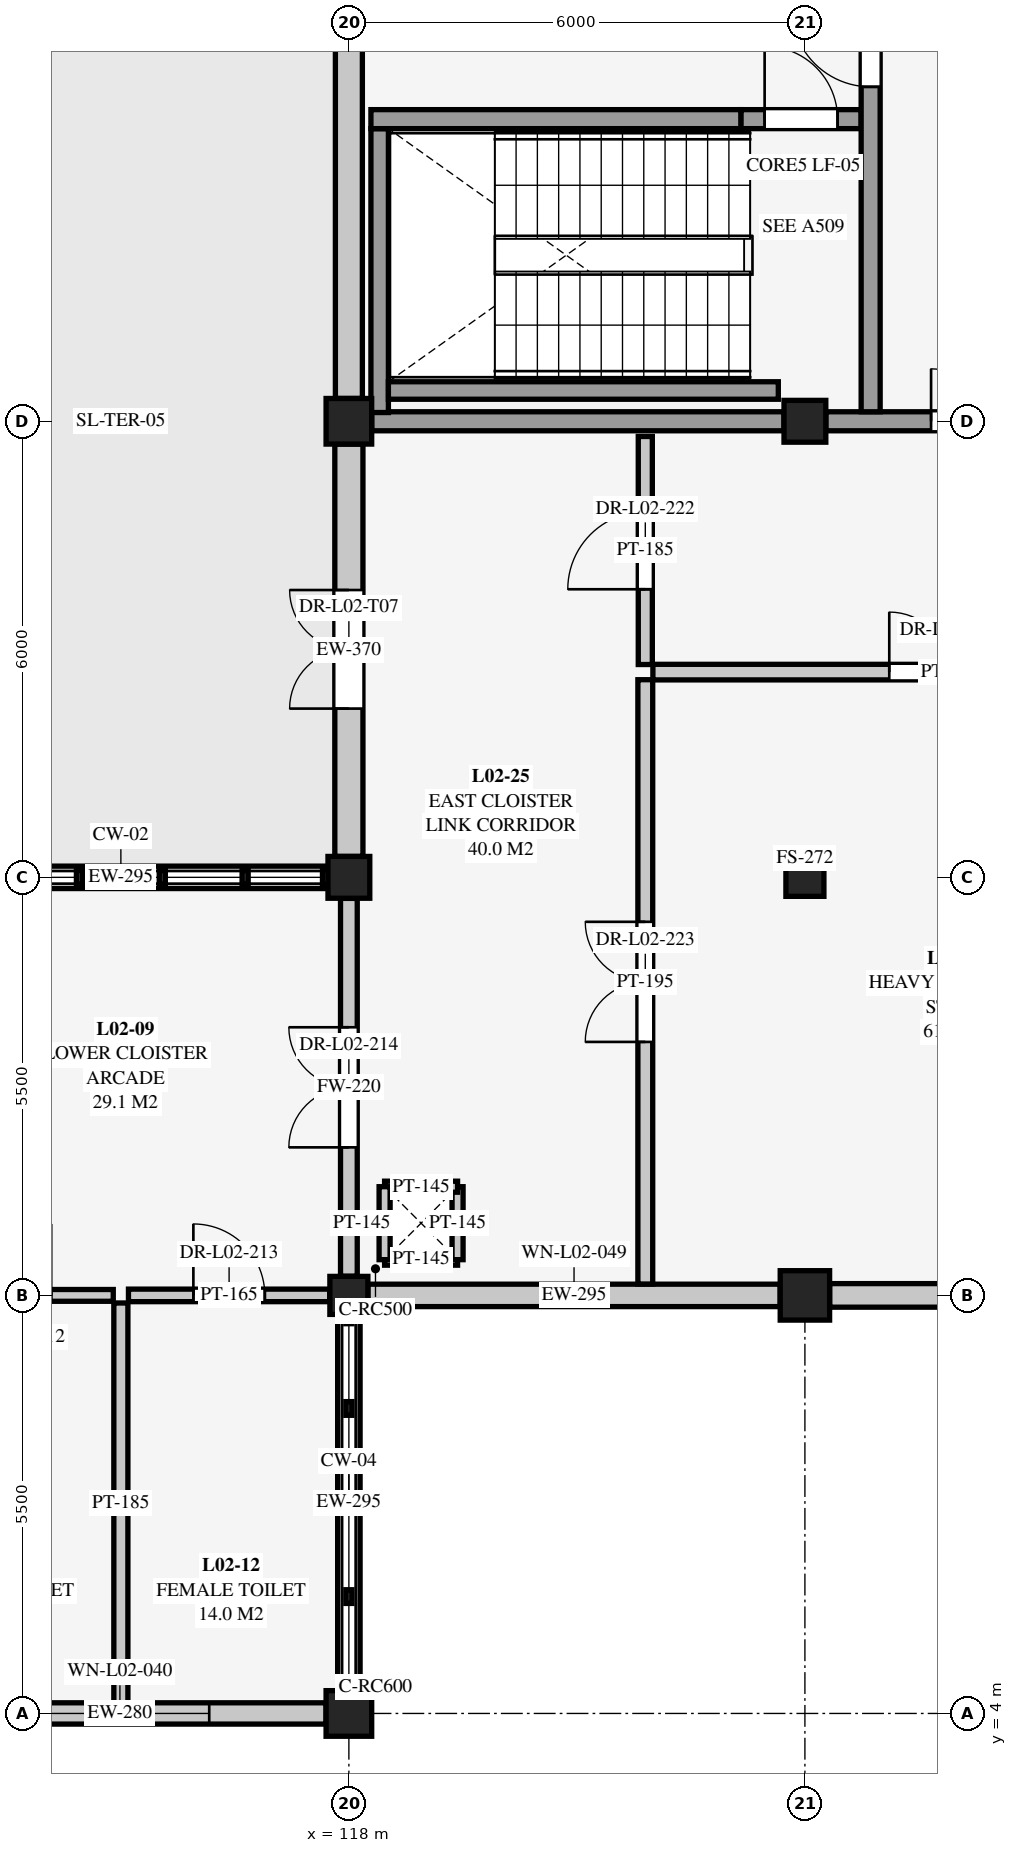
"""IFC4 building model, lengths in metres.
Left out: names, types, materials, properties, quantities, classifications, styles, units other than length and angle.
Written with IfcOpenShell. Run it as: python <this file> out.ifc"""

import sys

from ifc_helpers import new_model, si_unit, direction, frame, frame_2d, origin, origin_2d, place, context, subcontext, project, spatial, rectangle, extrude, element, fill, save


model = new_model("IFC4")
c1 = context("Model", 3, precision=1e-05, world=origin(), true_north=direction((0.0, 1.0)))
c2 = subcontext(c1, "Body", "Model", "MODEL_VIEW")
j1 = project(units=[si_unit("LENGTHUNIT", "METRE"), si_unit("PLANEANGLEUNIT", "RADIAN")], contexts=[c1])
p1 = place(None, origin())
s1 = spatial("IfcSite", under=j1, at=p1, CompositionType="ELEMENT")
p2 = place(p1, origin())
s2 = spatial("IfcBuilding", under=s1, at=p2, CompositionType="ELEMENT")
p3 = place(p2, frame((0.0, 0.0, 4.5)))
s3 = spatial("IfcBuildingStorey", under=s2, at=p3, CompositionType="ELEMENT", Elevation=4.5)
p4 = place(p3, frame((118.0, 4.0, 0.0), z_axis=(0.0, 0.0, 1.0), x_axis=(1.0, 0.0, 0.0)))
e1 = element("IfcColumn", 1, at=p4, inside=s3, PredefinedType="COLUMN", context=c2, shape_type="SweptSolid", body=[
    extrude(rectangle(XDim=0.6, YDim=0.6, at=origin_2d()), origin(), (0.0, 0.0, 1.0), 4.5),
])
p5 = place(p3, frame((118.0, 9.5, 0.0), z_axis=(0.0, 0.0, 1.0), x_axis=(1.0, 0.0, 0.0)))
e2 = element("IfcColumn", 2, at=p5, inside=s3, PredefinedType="COLUMN", context=c2, shape_type="SweptSolid", body=[
    extrude(rectangle(XDim=0.5, YDim=0.5, at=origin_2d()), origin(), (0.0, 0.0, 1.0), 4.5),
])
p6 = place(p3, frame((118.0, 15.0, 0.0), z_axis=(0.0, 0.0, 1.0), x_axis=(1.0, 0.0, 0.0)))
e3 = element("IfcColumn", 3, at=p6, inside=s3, PredefinedType="COLUMN", context=c2, shape_type="SweptSolid", body=[
    extrude(rectangle(XDim=0.55, YDim=0.55, at=origin_2d()), origin(), (0.0, 0.0, 1.0), 4.5),
])
p7 = place(p3, frame((118.0, 21.0, 0.0), z_axis=(0.0, 0.0, 1.0), x_axis=(1.0, 0.0, 0.0)))
e4 = element("IfcColumn", 4, at=p7, inside=s3, PredefinedType="COLUMN", context=c2, shape_type="SweptSolid", body=[
    extrude(rectangle(XDim=0.6, YDim=0.6, at=origin_2d()), origin(), (0.0, 0.0, 1.0), 4.5),
])
p8 = place(p3, frame((124.0, 9.5, 0.0), z_axis=(0.0, 0.0, 1.0), x_axis=(1.0, 0.0, 0.0)))
e5 = element("IfcColumn", 5, at=p8, inside=s3, PredefinedType="COLUMN", context=c2, shape_type="SweptSolid", body=[
    extrude(rectangle(XDim=0.65, YDim=0.65, at=origin_2d()), origin(), (0.0, 0.0, 1.0), 4.5),
])
p9 = place(p3, frame((124.0, 15.0, 0.0), z_axis=(0.0, 0.0, 1.0), x_axis=(1.0, 0.0, 0.0)))
e6 = element("IfcColumn", 6, at=p9, inside=s3, PredefinedType="COLUMN", context=c2, shape_type="SweptSolid", body=[
    extrude(rectangle(XDim=0.5, YDim=0.5, at=origin_2d()), origin(), (0.0, 0.0, 1.0), 4.5),
])
p10 = place(p3, frame((124.0, 21.0, 0.0), z_axis=(0.0, 0.0, 1.0), x_axis=(1.0, 0.0, 0.0)))
e7 = element("IfcColumn", 7, at=p10, inside=s3, PredefinedType="COLUMN", context=c2, shape_type="SweptSolid", body=[
    extrude(rectangle(XDim=0.55, YDim=0.55, at=origin_2d()), origin(), (0.0, 0.0, 1.0), 4.5),
])
p11 = place(p3, frame((117.7, 4.0, 0.0), z_axis=(0.0, 0.0, 1.0), x_axis=(-1.0, 0.0, 0.0)))
e8 = element("IfcWall", 8, at=p11, inside=s3, PredefinedType="SOLIDWALL", context=c2, shape_type="SweptSolid", body=[
    extrude(rectangle(XDim=5.425, YDim=0.28, at=frame_2d((2.712, 0.0))), origin(), (0.0, 0.0, 1.0), 3.843),
])
p12 = place(p11, frame((1.538, 0.0, 0.65)))
e9 = element("IfcOpeningElement", 9, at=p12, cuts=e8, PredefinedType="OPENING", context=c2, shape_type="SweptSolid", body=[
    extrude(rectangle(XDim=2.35, YDim=2.45, at=frame_2d((1.175, 1.225))), frame((0.0, 0.15, 0.0), z_axis=(0.0, -1.0, 0.0), x_axis=(1.0, 0.0, 0.0)), (0.0, 0.0, 1.0), 0.3),
])
p13 = place(p3, frame((112.275, 15.0, 0.0), z_axis=(0.0, 0.0, 1.0), x_axis=(1.0, 0.0, 0.0)))
e10 = element("IfcWall", 10, at=p13, inside=s3, PredefinedType="SOLIDWALL", context=c2, shape_type="SweptSolid", body=[
    extrude(rectangle(XDim=5.45, YDim=0.295, at=frame_2d((2.725, 0.0))), origin(), (0.0, 0.0, 1.0), 0.21),
])
p14 = place(p3, frame((118.0, 9.25, 0.0), z_axis=(0.0, 0.0, 1.0), x_axis=(0.0, -1.0, 0.0)))
e11 = element("IfcWall", 11, at=p14, inside=s3, PredefinedType="SOLIDWALL", context=c2, shape_type="SweptSolid", body=[
    extrude(rectangle(XDim=4.95, YDim=0.295, at=frame_2d((2.475, 0.0))), origin(), (0.0, 0.0, 1.0), 0.31),
])
p15 = place(p3, frame((123.675, 9.5, 0.0), z_axis=(0.0, 0.0, 1.0), x_axis=(-1.0, 0.0, 0.0)))
e12 = element("IfcWall", 12, at=p15, inside=s3, PredefinedType="SOLIDWALL", context=c2, shape_type="SweptSolid", body=[
    extrude(rectangle(XDim=5.425, YDim=0.295, at=frame_2d((2.712, 0.0))), origin(), (0.0, 0.0, 1.0), 3.809),
])
p16 = place(p15, frame((2.288, 0.0, 0.9)))
e13 = element("IfcOpeningElement", 13, at=p16, cuts=e12, PredefinedType="OPENING", context=c2, shape_type="SweptSolid", body=[
    extrude(rectangle(XDim=0.85, YDim=1.95, at=frame_2d((0.425, 0.975))), frame((0.0, 0.157, 0.0), z_axis=(0.0, -1.0, 0.0), x_axis=(1.0, 0.0, 0.0)), (0.0, 0.0, 1.0), 0.315),
])
p17 = place(p3, frame((129.7, 9.5, 0.0), z_axis=(0.0, 0.0, 1.0), x_axis=(-1.0, 0.0, 0.0)))
e14 = element("IfcWall", 14, at=p17, inside=s3, PredefinedType="SOLIDWALL", context=c2, shape_type="SweptSolid", body=[
    extrude(rectangle(XDim=5.375, YDim=0.31, at=frame_2d((2.688, 0.0))), origin(), (0.0, 0.0, 1.0), 3.809),
])
p18 = place(p17, frame((2.212, 0.0, 0.9)))
e15 = element("IfcOpeningElement", 15, at=p18, cuts=e14, PredefinedType="OPENING", context=c2, shape_type="SweptSolid", body=[
    extrude(rectangle(XDim=0.95, YDim=1.95, at=frame_2d((0.475, 0.975))), frame((0.0, 0.165, 0.0), z_axis=(0.0, -1.0, 0.0), x_axis=(1.0, 0.0, 0.0)), (0.0, 0.0, 1.0), 0.33),
])
p19 = place(p3, frame((118.0, 15.275, 0.0), z_axis=(0.0, 0.0, 1.0), x_axis=(0.0, 1.0, 0.0)))
e16 = element("IfcWall", 16, at=p19, inside=s3, PredefinedType="SOLIDWALL", context=c2, shape_type="SweptSolid", body=[
    extrude(rectangle(XDim=5.425, YDim=0.37, at=frame_2d((2.712, 0.0))), origin(), (0.0, 0.0, 1.0), 3.797),
])
p20 = place(p19, frame((1.945, 0.0, 0.0)))
e17 = element("IfcOpeningElement", 17, at=p20, cuts=e16, PredefinedType="OPENING", context=c2, shape_type="SweptSolid", body=[
    extrude(rectangle(XDim=1.56, YDim=2.18, at=frame_2d((0.78, 1.09))), frame((0.0, 0.195, 0.0), z_axis=(0.0, -1.0, 0.0), x_axis=(1.0, 0.0, 0.0)), (0.0, 0.0, 1.0), 0.39),
])
p21 = place(p3, frame((118.0, 21.3, 0.0), z_axis=(0.0, 0.0, 1.0), x_axis=(0.0, 1.0, 0.0)))
e18 = element("IfcWall", 18, at=p21, inside=s3, PredefinedType="SOLIDWALL", context=c2, shape_type="SweptSolid", body=[
    extrude(rectangle(XDim=5.4, YDim=0.355, at=frame_2d((2.7, 0.0))), origin(), (0.0, 0.0, 1.0), 3.797),
])
for number, where, z_axis, x_axis in (
    (19, (118.47, 9.97, 0.0), (0.0, 0.0, 1.0), (1.0, 0.0, 0.0)),
    (20, (119.43, 9.97, 0.0), (0.0, 0.0, 1.0), (0.0, 1.0, 0.0)),
    (21, (119.43, 10.93, 0.0), (0.0, 0.0, 1.0), (-1.0, 0.0, 0.0)),
    (22, (118.47, 10.93, 0.0), (0.0, 0.0, 1.0), (0.0, -1.0, 0.0)),
):
    element("IfcWall", number, at=place(p3, frame(where, z_axis=z_axis, x_axis=x_axis)), inside=s3, PredefinedType="PARTITIONING", context=c2, shape_type="SweptSolid", body=[
        extrude(rectangle(XDim=0.96, YDim=0.145, at=frame_2d((0.48, 0.0))), origin(), (0.0, 0.0, 1.0), 4.216),
    ])
p22 = place(p3, frame((118.3, 21.0, 0.0), z_axis=(0.0, 0.0, 1.0), x_axis=(1.0, 0.0, 0.0)))
e23 = element("IfcWall", 23, at=p22, inside=s3, PredefinedType="SHEAR", context=c2, shape_type="SweptSolid", body=[
    extrude(rectangle(XDim=5.425, YDim=0.25, at=frame_2d((2.712, 0.0))), origin(), (0.0, 0.0, 1.0), 4.204),
])
p23 = place(p3, frame((124.275, 21.0, 0.0), z_axis=(0.0, 0.0, 1.0), x_axis=(1.0, 0.0, 0.0)))
e24 = element("IfcWall", 24, at=p23, inside=s3, PredefinedType="SHEAR", context=c2, shape_type="SweptSolid", body=[
    extrude(rectangle(XDim=5.475, YDim=0.25, at=frame_2d((2.738, 0.0))), origin(), (0.0, 0.0, 1.0), 4.204),
])
p24 = place(p23, frame((1.385, 0.0, 0.0)))
e25 = element("IfcOpeningElement", 25, at=p24, cuts=e24, PredefinedType="OPENING", context=c2, shape_type="SweptSolid", body=[
    extrude(rectangle(XDim=1.38, YDim=2.16, at=frame_2d((0.69, 1.08))), frame((0.0, 0.135, 0.0), z_axis=(0.0, -1.0, 0.0), x_axis=(1.0, 0.0, 0.0)), (0.0, 0.0, 1.0), 0.27),
])
p25 = place(p3, frame((118.405, 21.115, 0.0), z_axis=(0.0, 0.0, 1.0), x_axis=(0.0, 1.0, 0.0)))
e26 = element("IfcWall", 26, at=p25, inside=s3, PredefinedType="SHEAR", context=c2, shape_type="SweptSolid", body=[
    extrude(rectangle(XDim=3.735, YDim=0.23, at=frame_2d((1.868, 0.0))), origin(), (0.0, 0.0, 1.0), 4.5),
])
p26 = place(p3, frame((118.52, 21.405, 0.0), z_axis=(0.0, 0.0, 1.0), x_axis=(1.0, 0.0, 0.0)))
e27 = element("IfcWall", 27, at=p26, inside=s3, PredefinedType="SHEAR", context=c2, shape_type="SweptSolid", body=[
    extrude(rectangle(XDim=5.13, YDim=0.23, at=frame_2d((2.565, 0.0))), origin(), (0.0, 0.0, 1.0), 4.5),
])
p27 = place(p3, frame((118.29, 24.975, 0.0), z_axis=(0.0, 0.0, 1.0), x_axis=(1.0, 0.0, 0.0)))
e28 = element("IfcWall", 28, at=p27, inside=s3, PredefinedType="SHEAR", context=c2, shape_type="SweptSolid", body=[
    extrude(rectangle(XDim=4.87, YDim=0.25, at=frame_2d((2.435, 0.0))), origin(), (0.0, 0.0, 1.0), 4.5),
])
p28 = place(p3, frame((123.16, 24.975, 0.0), z_axis=(0.0, 0.0, 1.0), x_axis=(1.0, 0.0, 0.0)))
e29 = element("IfcWall", 29, at=p28, inside=s3, PredefinedType="SHEAR", context=c2, shape_type="SweptSolid", body=[
    extrude(rectangle(XDim=1.58, YDim=0.25, at=frame_2d((0.79, 0.0))), origin(), (0.0, 0.0, 1.0), 4.204),
])
p29 = place(p28, frame((0.31, 0.0, 0.0)))
e30 = element("IfcOpeningElement", 30, at=p29, cuts=e29, PredefinedType="OPENING", context=c2, shape_type="SweptSolid", body=[
    extrude(rectangle(XDim=0.96, YDim=2.12, at=frame_2d((0.48, 1.06))), frame((0.0, 0.135, 0.0), z_axis=(0.0, -1.0, 0.0), x_axis=(1.0, 0.0, 0.0)), (0.0, 0.0, 1.0), 0.27),
])
p30 = place(p3, frame((124.865, 21.125, 0.0), z_axis=(0.0, 0.0, 1.0), x_axis=(0.0, 1.0, 0.0)))
e31 = element("IfcWall", 31, at=p30, inside=s3, PredefinedType="SHEAR", context=c2, shape_type="SweptSolid", body=[
    extrude(rectangle(XDim=5.75, YDim=0.25, at=frame_2d((2.875, 0.0))), origin(), (0.0, 0.0, 1.0), 4.204),
])
p31 = place(p30, frame((4.275, 0.0, 0.0)))
e32 = element("IfcOpeningElement", 32, at=p31, cuts=e31, PredefinedType="OPENING", context=c2, shape_type="SweptSolid", body=[
    extrude(rectangle(XDim=1.04, YDim=2.14, at=frame_2d((0.52, 1.07))), frame((0.0, 0.135, 0.0), z_axis=(0.0, -1.0, 0.0), x_axis=(1.0, 0.0, 0.0)), (0.0, 0.0, 1.0), 0.27),
])
p32 = place(p3, frame((112.327, 9.5, 0.0), z_axis=(0.0, 0.0, 1.0), x_axis=(1.0, 0.0, 0.0)))
e33 = element("IfcWall", 33, at=p32, inside=s3, PredefinedType="PARTITIONING", context=c2, shape_type="SweptSolid", body=[
    extrude(rectangle(XDim=2.573, YDim=0.155, at=frame_2d((1.287, 0.0))), origin(), (0.0, 0.0, 1.0), 3.95),
])
p33 = place(p32, frame((0.816, 0.0, 0.0)))
e34 = element("IfcOpeningElement", 34, at=p33, cuts=e33, PredefinedType="OPENING", context=c2, shape_type="SweptSolid", body=[
    extrude(rectangle(XDim=0.94, YDim=2.1, at=frame_2d((0.47, 1.05))), frame((0.0, 0.088, 0.0), z_axis=(0.0, -1.0, 0.0), x_axis=(1.0, 0.0, 0.0)), (0.0, 0.0, 1.0), 0.175),
])
p34 = place(p3, frame((115.1, 9.5, 0.0), z_axis=(0.0, 0.0, 1.0), x_axis=(1.0, 0.0, 0.0)))
e35 = element("IfcWall", 35, at=p34, inside=s3, PredefinedType="PARTITIONING", context=c2, shape_type="SweptSolid", body=[
    extrude(rectangle(XDim=2.648, YDim=0.165, at=frame_2d((1.324, 0.0))), origin(), (0.0, 0.0, 1.0), 3.95),
])
p35 = place(p34, frame((0.854, 0.0, 0.0)))
e36 = element("IfcOpeningElement", 36, at=p35, cuts=e35, PredefinedType="OPENING", context=c2, shape_type="SweptSolid", body=[
    extrude(rectangle(XDim=0.94, YDim=2.1, at=frame_2d((0.47, 1.05))), frame((0.0, 0.093, 0.0), z_axis=(0.0, -1.0, 0.0), x_axis=(1.0, 0.0, 0.0)), (0.0, 0.0, 1.0), 0.185),
])
p36 = place(p3, frame((118.0, 9.752, 0.0), z_axis=(0.0, 0.0, 1.0), x_axis=(0.0, 1.0, 0.0)))
e37 = element("IfcWall", 37, at=p36, inside=s3, PredefinedType="SOLIDWALL", context=c2, shape_type="SweptSolid", body=[
    extrude(rectangle(XDim=4.971, YDim=0.22, at=frame_2d((2.485, 0.0))), origin(), (0.0, 0.0, 1.0), 3.759),
])
p37 = place(p36, frame((1.696, 0.0, 0.0)))
e38 = element("IfcOpeningElement", 38, at=p37, cuts=e37, PredefinedType="OPENING", context=c2, shape_type="SweptSolid", body=[
    extrude(rectangle(XDim=1.58, YDim=2.2, at=frame_2d((0.79, 1.1))), frame((0.0, 0.12, 0.0), z_axis=(0.0, -1.0, 0.0), x_axis=(1.0, 0.0, 0.0)), (0.0, 0.0, 1.0), 0.24),
])
p38 = place(p3, frame((115.0, 4.142, 0.0), z_axis=(0.0, 0.0, 1.0), x_axis=(0.0, 1.0, 0.0)))
e39 = element("IfcWall", 39, at=p38, inside=s3, PredefinedType="PARTITIONING", context=c2, shape_type="SweptSolid", body=[
    extrude(rectangle(XDim=5.258, YDim=0.185, at=frame_2d((2.629, 0.0))), origin(), (0.0, 0.0, 1.0), 4.24),
])
p39 = place(p3, frame((121.9, 17.8, 0.0), z_axis=(0.0, 0.0, 1.0), x_axis=(0.0, 1.0, 0.0)))
e40 = element("IfcWall", 40, at=p39, inside=s3, PredefinedType="PARTITIONING", context=c2, shape_type="SweptSolid", body=[
    extrude(rectangle(XDim=3.0, YDim=0.185, at=frame_2d((1.5, 0.0))), origin(), (0.0, 0.0, 1.0), 4.216),
])
p40 = place(p39, frame((0.99, 0.0, 0.0)))
e41 = element("IfcOpeningElement", 41, at=p40, cuts=e40, PredefinedType="OPENING", context=c2, shape_type="SweptSolid", body=[
    extrude(rectangle(XDim=1.02, YDim=2.16, at=frame_2d((0.51, 1.08))), frame((0.0, 0.103, 0.0), z_axis=(0.0, -1.0, 0.0), x_axis=(1.0, 0.0, 0.0)), (0.0, 0.0, 1.0), 0.205),
])
p41 = place(p3, frame((121.9, 9.649, 0.0), z_axis=(0.0, 0.0, 1.0), x_axis=(0.0, 1.0, 0.0)))
e42 = element("IfcWall", 42, at=p41, inside=s3, PredefinedType="PARTITIONING", context=c2, shape_type="SweptSolid", body=[
    extrude(rectangle(XDim=7.951, YDim=0.195, at=frame_2d((3.975, 0.0))), origin(), (0.0, 0.0, 1.0), 4.216),
])
p42 = place(p41, frame((3.185, 0.0, 0.0)))
e43 = element("IfcOpeningElement", 43, at=p42, cuts=e42, PredefinedType="OPENING", context=c2, shape_type="SweptSolid", body=[
    extrude(rectangle(XDim=1.58, YDim=2.2, at=frame_2d((0.79, 1.1))), frame((0.0, 0.108, 0.0), z_axis=(0.0, -1.0, 0.0), x_axis=(1.0, 0.0, 0.0)), (0.0, 0.0, 1.0), 0.215),
])
p43 = place(p3, frame((122.0, 17.7, 0.0), z_axis=(0.0, 0.0, 1.0), x_axis=(1.0, 0.0, 0.0)))
e44 = element("IfcWall", 44, at=p43, inside=s3, PredefinedType="PARTITIONING", context=c2, shape_type="SweptSolid", body=[
    extrude(rectangle(XDim=7.8, YDim=0.205, at=frame_2d((3.9, 0.0))), origin(), (0.0, 0.0, 1.0), 4.216),
])
p44 = place(p43, frame((3.11, 0.0, 0.0)))
e45 = element("IfcOpeningElement", 45, at=p44, cuts=e44, PredefinedType="OPENING", context=c2, shape_type="SweptSolid", body=[
    extrude(rectangle(XDim=1.58, YDim=2.2, at=frame_2d((0.79, 1.1))), frame((0.0, 0.113, 0.0), z_axis=(0.0, -1.0, 0.0), x_axis=(1.0, 0.0, 0.0)), (0.0, 0.0, 1.0), 0.225),
])
p45 = place(p12, origin())
e46 = element("IfcWindow", 46, at=p45, inside=s3, PartitioningType="SINGLE_PANEL", PredefinedType="WINDOW", context=c2, shape_type="SweptSolid", body=[
    extrude(rectangle(XDim=2.35, YDim=2.45, at=frame_2d((1.175, 1.225))), frame((0.0, 0.03, 0.0), z_axis=(0.0, -1.0, 0.0), x_axis=(1.0, 0.0, 0.0)), (0.0, 0.0, 1.0), 0.06),
])
fill(e9, e46)
p46 = place(p16, origin())
e47 = element("IfcWindow", 47, at=p46, inside=s3, PartitioningType="SINGLE_PANEL", PredefinedType="WINDOW", context=c2, shape_type="SweptSolid", body=[
    extrude(rectangle(XDim=0.85, YDim=1.95, at=frame_2d((0.425, 0.975))), frame((0.0, 0.03, 0.0), z_axis=(0.0, -1.0, 0.0), x_axis=(1.0, 0.0, 0.0)), (0.0, 0.0, 1.0), 0.06),
])
fill(e13, e47)
p47 = place(p20, origin())
e48 = element("IfcDoor", 48, at=p47, inside=s3, OperationType="DOUBLE_DOOR_SINGLE_SWING", PredefinedType="DOOR", context=c2, shape_type="SweptSolid", body=[
    extrude(rectangle(XDim=1.56, YDim=2.18, at=frame_2d((0.78, 1.09))), frame((0.0, 0.025, 0.0), z_axis=(0.0, -1.0, 0.0), x_axis=(1.0, 0.0, 0.0)), (0.0, 0.0, 1.0), 0.05),
])
fill(e17, e48)
p48 = place(p24, origin())
e49 = element("IfcDoor", 49, at=p48, inside=s3, OperationType="DOUBLE_DOOR_SINGLE_SWING", PredefinedType="DOOR", context=c2, shape_type="SweptSolid", body=[
    extrude(rectangle(XDim=1.38, YDim=2.16, at=frame_2d((0.69, 1.08))), frame((0.0, 0.025, 0.0), z_axis=(0.0, -1.0, 0.0), x_axis=(1.0, 0.0, 0.0)), (0.0, 0.0, 1.0), 0.05),
])
fill(e25, e49)
p49 = place(p29, origin())
e50 = element("IfcDoor", 50, at=p49, inside=s3, OperationType="SINGLE_SWING_LEFT", PredefinedType="DOOR", context=c2, shape_type="SweptSolid", body=[
    extrude(rectangle(XDim=0.96, YDim=2.12, at=frame_2d((0.48, 1.06))), frame((0.0, 0.025, 0.0), z_axis=(0.0, -1.0, 0.0), x_axis=(1.0, 0.0, 0.0)), (0.0, 0.0, 1.0), 0.05),
])
fill(e30, e50)
p50 = place(p31, origin())
e51 = element("IfcDoor", 51, at=p50, inside=s3, OperationType="SINGLE_SWING_RIGHT", PredefinedType="DOOR", context=c2, shape_type="SweptSolid", body=[
    extrude(rectangle(XDim=1.04, YDim=2.14, at=frame_2d((0.52, 1.07))), frame((0.0, 0.025, 0.0), z_axis=(0.0, -1.0, 0.0), x_axis=(1.0, 0.0, 0.0)), (0.0, 0.0, 1.0), 0.05),
])
fill(e32, e51)
p51 = place(p35, origin())
e52 = element("IfcDoor", 52, at=p51, inside=s3, OperationType="SINGLE_SWING_LEFT", PredefinedType="DOOR", context=c2, shape_type="SweptSolid", body=[
    extrude(rectangle(XDim=0.94, YDim=2.1, at=frame_2d((0.47, 1.05))), frame((0.0, 0.025, 0.0), z_axis=(0.0, -1.0, 0.0), x_axis=(1.0, 0.0, 0.0)), (0.0, 0.0, 1.0), 0.05),
])
fill(e36, e52)
p52 = place(p37, origin())
e53 = element("IfcDoor", 53, at=p52, inside=s3, OperationType="DOUBLE_DOOR_SINGLE_SWING", PredefinedType="DOOR", context=c2, shape_type="SweptSolid", body=[
    extrude(rectangle(XDim=1.58, YDim=2.2, at=frame_2d((0.79, 1.1))), frame((0.0, 0.025, 0.0), z_axis=(0.0, -1.0, 0.0), x_axis=(1.0, 0.0, 0.0)), (0.0, 0.0, 1.0), 0.05),
])
fill(e38, e53)
p53 = place(p40, origin())
e54 = element("IfcDoor", 54, at=p53, inside=s3, OperationType="SINGLE_SWING_LEFT", PredefinedType="DOOR", context=c2, shape_type="SweptSolid", body=[
    extrude(rectangle(XDim=1.02, YDim=2.16, at=frame_2d((0.51, 1.08))), frame((0.0, 0.025, 0.0), z_axis=(0.0, -1.0, 0.0), x_axis=(1.0, 0.0, 0.0)), (0.0, 0.0, 1.0), 0.05),
])
fill(e41, e54)
p54 = place(p42, origin())
e55 = element("IfcDoor", 55, at=p54, inside=s3, OperationType="DOUBLE_DOOR_SINGLE_SWING", PredefinedType="DOOR", context=c2, shape_type="SweptSolid", body=[
    extrude(rectangle(XDim=1.58, YDim=2.2, at=frame_2d((0.79, 1.1))), frame((0.0, 0.025, 0.0), z_axis=(0.0, -1.0, 0.0), x_axis=(1.0, 0.0, 0.0)), (0.0, 0.0, 1.0), 0.05),
])
fill(e43, e55)
p55 = place(p44, origin())
e56 = element("IfcDoor", 56, at=p55, inside=s3, OperationType="DOUBLE_DOOR_SINGLE_SWING", PredefinedType="DOOR", context=c2, shape_type="SweptSolid", body=[
    extrude(rectangle(XDim=1.58, YDim=2.2, at=frame_2d((0.79, 1.1))), frame((0.0, 0.025, 0.0), z_axis=(0.0, -1.0, 0.0), x_axis=(1.0, 0.0, 0.0)), (0.0, 0.0, 1.0), 0.05),
])
fill(e45, e56)
save(model, sys.argv[1])
